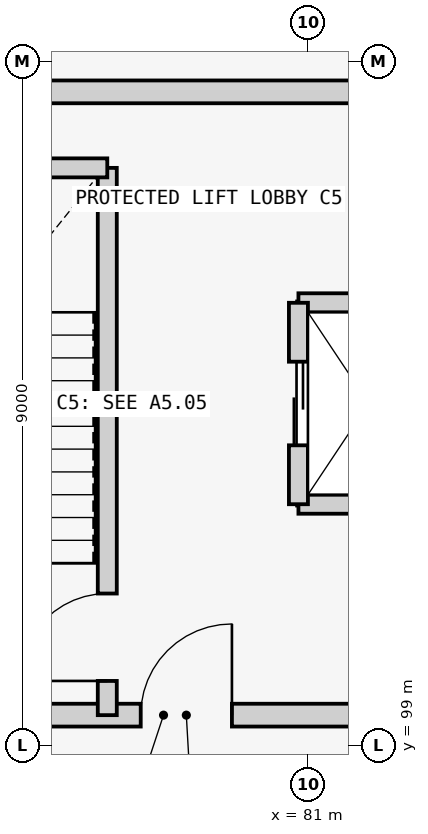
"""IFC4 building model, lengths in metres.
Left out: names, types, materials, properties, quantities, classifications, styles, units other than length and angle.
Written with IfcOpenShell. Run it as: python <this file> out.ifc"""

import sys

from ifc_helpers import new_model, si_unit, direction, frame, frame_2d, origin, place, context, subcontext, project, spatial, rectangle, extrude, element, fill, save


model = new_model("IFC4")
c1 = context("Model", 3, precision=1e-05, world=origin(), true_north=direction((0.0, 1.0)))
c2 = subcontext(c1, "Body", "Model", "MODEL_VIEW")
j1 = project(units=[si_unit("LENGTHUNIT", "METRE"), si_unit("PLANEANGLEUNIT", "RADIAN")], contexts=[c1])
p1 = place(None, origin())
s1 = spatial("IfcSite", under=j1, at=p1, CompositionType="ELEMENT")
p2 = place(p1, origin())
s2 = spatial("IfcBuilding", under=s1, at=p2, CompositionType="ELEMENT")
p3 = place(p2, frame((0.0, 0.0, 12.6)))
s3 = spatial("IfcBuildingStorey", under=s2, at=p3, CompositionType="ELEMENT", Elevation=12.6)
p4 = place(p3, frame((74.0, 99.4, 0.0), z_axis=(0.0, 0.0, 1.0), x_axis=(1.0, 0.0, 0.0)))
e1 = element("IfcWall", 1, at=p4, inside=s3, PredefinedType="SHEAR", context=c2, shape_type="SweptSolid", body=[
    extrude(rectangle(XDim=10.2, YDim=0.3, at=frame_2d((5.1, 0.0))), origin(), (0.0, 0.0, 1.0), 3.925),
])
p5 = place(p4, frame((4.8, 0.0, 0.0)))
e2 = element("IfcOpeningElement", 2, at=p5, cuts=e1, PredefinedType="OPENING", context=c2, shape_type="SweptSolid", body=[
    extrude(rectangle(XDim=1.2, YDim=2.15, at=frame_2d((0.6, 1.075))), frame((0.0, 0.16, 0.0), z_axis=(0.0, -1.0, 0.0), x_axis=(1.0, 0.0, 0.0)), (0.0, 0.0, 1.0), 0.32),
])
p6 = place(p3, frame((84.2, 107.6, 0.0), z_axis=(0.0, 0.0, 1.0), x_axis=(-1.0, 0.0, 0.0)))
e3 = element("IfcWall", 3, at=p6, inside=s3, PredefinedType="SHEAR", context=c2, shape_type="SweptSolid", body=[
    extrude(rectangle(XDim=10.2, YDim=0.3, at=frame_2d((5.1, 0.0))), origin(), (0.0, 0.0, 1.0), 3.925),
])
p7 = place(p3, frame((78.36, 99.4, 0.0), z_axis=(0.0, 0.0, 1.0), x_axis=(0.0, 1.0, 0.0)))
e4 = element("IfcWall", 4, at=p7, inside=s3, PredefinedType="SHEAR", context=c2, shape_type="SweptSolid", body=[
    extrude(rectangle(XDim=7.2, YDim=0.25, at=frame_2d((3.6, 0.0))), origin(), (0.0, 0.0, 1.0), 3.925),
])
p8 = place(p7, frame((0.45, 0.0, 0.0)))
e5 = element("IfcOpeningElement", 5, at=p8, cuts=e4, PredefinedType="OPENING", context=c2, shape_type="SweptSolid", body=[
    extrude(rectangle(XDim=1.15, YDim=2.15, at=frame_2d((0.575, 1.075))), frame((0.0, 0.135, 0.0), z_axis=(0.0, -1.0, 0.0), x_axis=(1.0, 0.0, 0.0)), (0.0, 0.0, 1.0), 0.27),
])
p9 = place(p3, frame((74.0, 106.6, 0.0), z_axis=(0.0, 0.0, 1.0), x_axis=(1.0, 0.0, 0.0)))
e6 = element("IfcWall", 6, at=p9, inside=s3, PredefinedType="SHEAR", context=c2, shape_type="SweptSolid", body=[
    extrude(rectangle(XDim=4.36, YDim=0.25, at=frame_2d((2.18, 0.0))), origin(), (0.0, 0.0, 1.0), 3.925),
])
for number, where, z_axis, x_axis in (
    (7, (80.875, 102.175, 0.0), (0.0, 0.0, 1.0), (1.0, 0.0, 0.0)),
    (8, (80.875, 104.825, 0.0), (0.0, 0.0, 1.0), (1.0, 0.0, 0.0)),
):
    element("IfcWall", number, at=place(p3, frame(where, z_axis=z_axis, x_axis=x_axis)), inside=s3, PredefinedType="SHEAR", context=c2, shape_type="SweptSolid", body=[
        extrude(rectangle(XDim=1.85, YDim=0.25, at=frame_2d((0.925, 0.0))), origin(), (0.0, 0.0, 1.0), 3.925),
    ])
p10 = place(p3, frame((80.875, 102.175, 0.0), z_axis=(0.0, 0.0, 1.0), x_axis=(0.0, 1.0, 0.0)))
e9 = element("IfcWall", 9, at=p10, inside=s3, PredefinedType="SHEAR", context=c2, shape_type="SweptSolid", body=[
    extrude(rectangle(XDim=2.65, YDim=0.25, at=frame_2d((1.325, 0.0))), origin(), (0.0, 0.0, 1.0), 3.925),
])
p11 = place(p10, frame((0.775, 0.0, 0.0)))
e10 = element("IfcOpeningElement", 10, at=p11, cuts=e9, PredefinedType="OPENING", context=c2, shape_type="SweptSolid", body=[
    extrude(rectangle(XDim=1.1, YDim=2.15, at=frame_2d((0.55, 1.075))), frame((0.0, 0.135, 0.0), z_axis=(0.0, -1.0, 0.0), x_axis=(1.0, 0.0, 0.0)), (0.0, 0.0, 1.0), 0.27),
])
p12 = place(p8, origin())
e11 = element("IfcDoor", 11, at=p12, inside=s3, OperationType="SINGLE_SWING_LEFT", PredefinedType="DOOR", context=c2, shape_type="SweptSolid", body=[
    extrude(rectangle(XDim=1.15, YDim=2.15, at=frame_2d((0.575, 1.075))), frame((0.0, 0.025, 0.0), z_axis=(0.0, -1.0, 0.0), x_axis=(1.0, 0.0, 0.0)), (0.0, 0.0, 1.0), 0.05),
])
fill(e5, e11)
p13 = place(p5, origin())
e12 = element("IfcDoor", 12, at=p13, inside=s3, OperationType="SINGLE_SWING_RIGHT", PredefinedType="DOOR", context=c2, shape_type="SweptSolid", body=[
    extrude(rectangle(XDim=1.2, YDim=2.15, at=frame_2d((0.6, 1.075))), frame((0.0, 0.025, 0.0), z_axis=(0.0, -1.0, 0.0), x_axis=(1.0, 0.0, 0.0)), (0.0, 0.0, 1.0), 0.05),
])
fill(e2, e12)
p14 = place(p11, origin())
e13 = element("IfcDoor", 13, at=p14, inside=s3, OperationType="DOUBLE_DOOR_SLIDING", PredefinedType="USERDEFINED", context=c2, shape_type="SweptSolid", body=[
    extrude(rectangle(XDim=1.1, YDim=2.15, at=frame_2d((0.55, 1.075))), frame((0.0, 0.025, 0.0), z_axis=(0.0, -1.0, 0.0), x_axis=(1.0, 0.0, 0.0)), (0.0, 0.0, 1.0), 0.05),
])
fill(e10, e13)
save(model, sys.argv[1])
